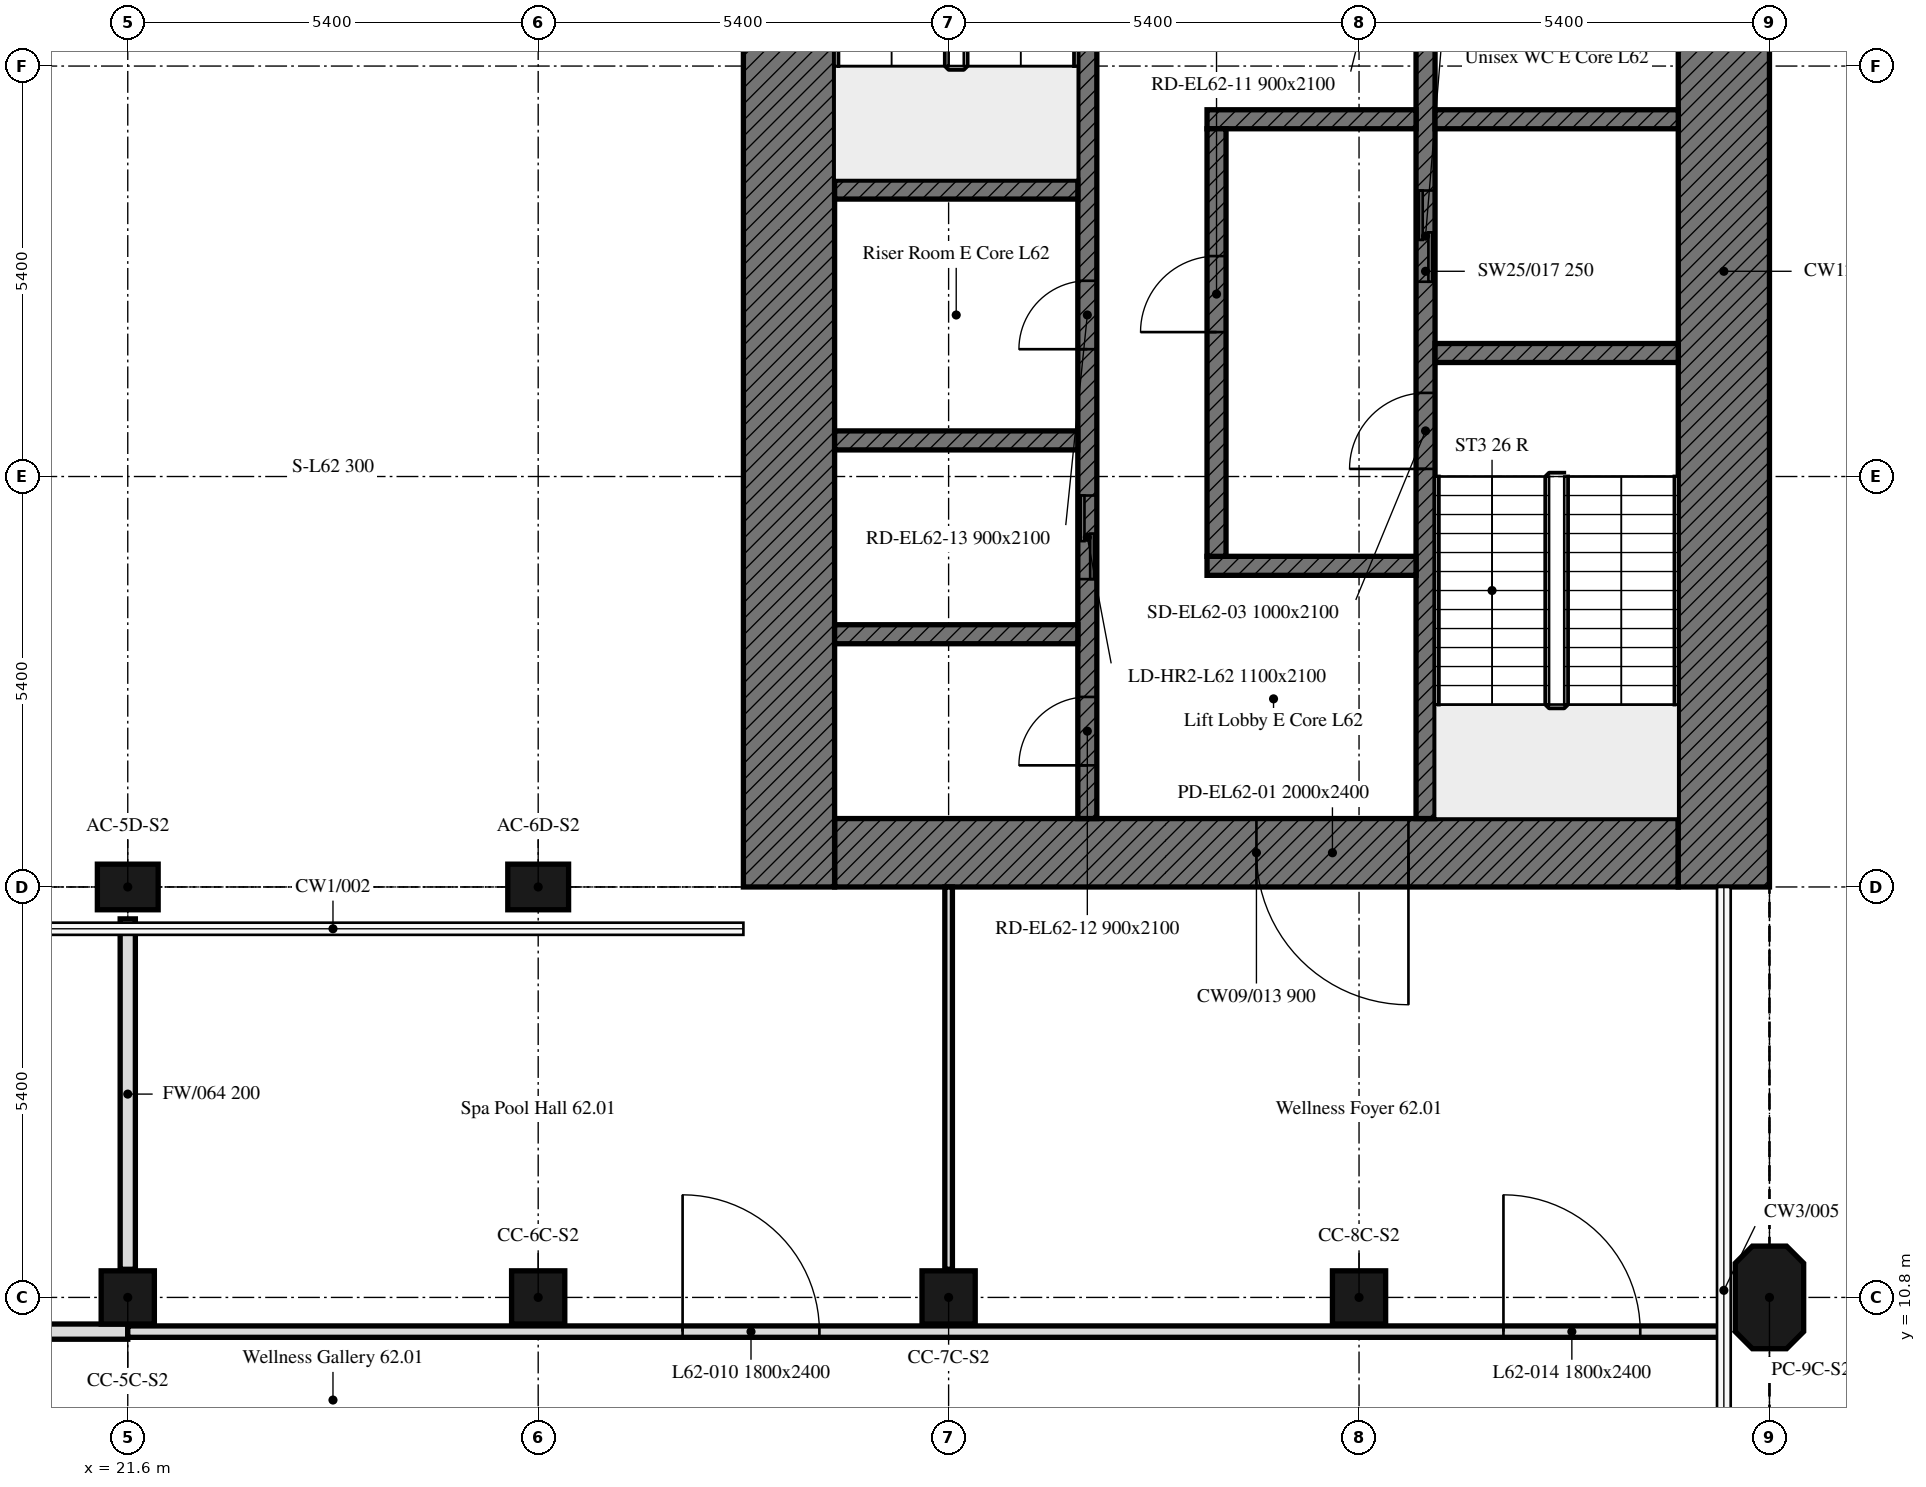
"""IFC4 building model, lengths in metres.
Left out: names, types, materials, properties, quantities, classifications, styles, units other than length and angle.
Written with IfcOpenShell. Run it as: python <this file> out.ifc"""

import sys

from ifc_helpers import new_model, si_unit, direction, frame, frame_2d, origin, origin_2d, place, context, subcontext, project, spatial, polyline, rectangle, outline, extrude, element, fill, save


model = new_model("IFC4")
c1 = context("Model", 3, precision=1e-05, world=origin(), true_north=direction((0.0, 1.0)))
c2 = subcontext(c1, "Body", "Model", "MODEL_VIEW")
j1 = project(units=[si_unit("LENGTHUNIT", "METRE"), si_unit("PLANEANGLEUNIT", "RADIAN")], contexts=[c1])
p1 = place(None, origin())
s1 = spatial("IfcSite", under=j1, at=p1, CompositionType="ELEMENT")
p2 = place(p1, origin())
s2 = spatial("IfcBuilding", under=s1, at=p2, CompositionType="ELEMENT")
p3 = place(p2, frame((0.0, 0.0, 255.7)))
s3 = spatial("IfcBuildingStorey", under=s2, at=p3, CompositionType="ELEMENT", Elevation=255.7)
for number, where, z_axis, x_axis in (
    (1, (21.6, 10.8, 0.0), (0.0, 0.0, 1.0), (1.0, 0.0, 0.0)),
    (2, (27.0, 10.8, 0.0), (0.0, 0.0, 1.0), (1.0, 0.0, 0.0)),
    (3, (32.4, 10.8, 0.0), (0.0, 0.0, 1.0), (1.0, 0.0, 0.0)),
    (4, (37.8, 10.8, 0.0), (0.0, 0.0, 1.0), (1.0, 0.0, 0.0)),
):
    element("IfcColumn", number, at=place(p3, frame(where, z_axis=z_axis, x_axis=x_axis)), inside=s3, PredefinedType="COLUMN", context=c2, shape_type="SweptSolid", body=[
        extrude(rectangle(XDim=0.7, YDim=0.7, at=origin_2d()), origin(), (0.0, 0.0, 1.0), 4.5),
    ])
p4 = place(p3, frame((43.2, 10.8, 0.0), z_axis=(0.0, 0.0, 1.0), x_axis=(0.0, 1.0, 0.0)))
e5 = element("IfcColumn", 5, at=p4, inside=s3, PredefinedType="COLUMN", context=c2, shape_type="SweptSolid", body=[
    extrude(outline(polyline([(-0.45, -0.45), (0.45, -0.45), (0.675, -0.225), (0.675, 0.225), (0.45, 0.45), (-0.45, 0.45), (-0.675, 0.225), (-0.675, -0.225), (-0.45, -0.45)])), origin(), (0.0, 0.0, 1.0), 4.5),
])
for number, where, z_axis, x_axis in (
    (6, (21.6, 16.2, 0.0), (0.0, 0.0, 1.0), (1.0, 0.0, 0.0)),
    (7, (27.0, 16.2, 0.0), (0.0, 0.0, 1.0), (1.0, 0.0, 0.0)),
):
    element("IfcColumn", number, at=place(p3, frame(where, z_axis=z_axis, x_axis=x_axis)), inside=s3, PredefinedType="COLUMN", context=c2, shape_type="SweptSolid", body=[
        extrude(rectangle(XDim=0.8, YDim=0.6, at=origin_2d()), origin(), (0.0, 0.0, 1.0), 4.5),
    ])
p5 = place(p3, frame((42.0, 16.65, 0.0), z_axis=(0.0, 0.0, 1.0), x_axis=(-1.0, 0.0, 0.0)))
e8 = element("IfcWall", 8, at=p5, inside=s3, PredefinedType="SOLIDWALL", context=c2, shape_type="SweptSolid", body=[
    extrude(rectangle(XDim=11.1, YDim=0.9, at=frame_2d((5.55, 0.0))), origin(), (0.0, 0.0, 1.0), 4.5),
])
p6 = place(p5, frame((3.55, 0.0, 0.0)))
e9 = element("IfcOpeningElement", 9, at=p6, cuts=e8, PredefinedType="OPENING", context=c2, shape_type="SweptSolid", body=[
    extrude(rectangle(XDim=2.0, YDim=2.4, at=frame_2d((1.0, 1.2))), frame((0.0, 0.45, 0.0), z_axis=(0.0, -1.0, 0.0), x_axis=(1.0, 0.0, 0.0)), (0.0, 0.0, 1.0), 0.9),
])
for number, where, z_axis, x_axis in (
    (10, (42.6, 32.4, 0.0), (0.0, 0.0, 1.0), (0.0, -1.0, 0.0)),
    (11, (30.3, 16.2, 0.0), (0.0, 0.0, 1.0), (0.0, 1.0, 0.0)),
):
    element("IfcWall", number, at=place(p3, frame(where, z_axis=z_axis, x_axis=x_axis)), inside=s3, PredefinedType="SOLIDWALL", context=c2, shape_type="SweptSolid", body=[
        extrude(rectangle(XDim=16.2, YDim=1.2, at=frame_2d((8.1, 0.0))), origin(), (0.0, 0.0, 1.0), 4.5),
    ])
p7 = place(p3, frame((38.675, 17.1, 0.0), z_axis=(0.0, 0.0, 1.0), x_axis=(0.0, 1.0, 0.0)))
e12 = element("IfcWall", 12, at=p7, inside=s3, PredefinedType="SOLIDWALL", context=c2, shape_type="SweptSolid", body=[
    extrude(rectangle(XDim=14.4, YDim=0.25, at=frame_2d((7.2, 0.0))), origin(), (0.0, 0.0, 1.0), 4.5),
])
p8 = place(p7, frame((4.6, 0.0, 0.0)))
e13 = element("IfcOpeningElement", 13, at=p8, cuts=e12, PredefinedType="OPENING", context=c2, shape_type="SweptSolid", body=[
    extrude(rectangle(XDim=1.0, YDim=2.1, at=frame_2d((0.5, 1.05))), frame((0.0, 0.125, 0.0), z_axis=(0.0, -1.0, 0.0), x_axis=(1.0, 0.0, 0.0)), (0.0, 0.0, 1.0), 0.25),
])
p9 = place(p7, frame((7.062, 0.0, 0.0)))
e14 = element("IfcOpeningElement", 14, at=p9, cuts=e12, PredefinedType="OPENING", context=c2, shape_type="SweptSolid", body=[
    extrude(rectangle(XDim=1.2, YDim=2.1, at=frame_2d((0.6, 1.05))), frame((0.0, 0.125, 0.0), z_axis=(0.0, -1.0, 0.0), x_axis=(1.0, 0.0, 0.0)), (0.0, 0.0, 1.0), 0.25),
])
p10 = place(p7, frame((10.106, 0.0, 0.0)))
e15 = element("IfcOpeningElement", 15, at=p10, cuts=e12, PredefinedType="OPENING", context=c2, shape_type="SweptSolid", body=[
    extrude(rectangle(XDim=0.9, YDim=2.1, at=frame_2d((0.45, 1.05))), frame((0.0, 0.125, 0.0), z_axis=(0.0, -1.0, 0.0), x_axis=(1.0, 0.0, 0.0)), (0.0, 0.0, 1.0), 0.25),
])
p11 = place(p7, frame((12.048, 0.0, 0.0)))
e16 = element("IfcOpeningElement", 16, at=p11, cuts=e12, PredefinedType="OPENING", context=c2, shape_type="SweptSolid", body=[
    extrude(rectangle(XDim=0.9, YDim=2.1, at=frame_2d((0.45, 1.05))), frame((0.0, 0.125, 0.0), z_axis=(0.0, -1.0, 0.0), x_axis=(1.0, 0.0, 0.0)), (0.0, 0.0, 1.0), 0.25),
])
p12 = place(p7, frame((13.354, 0.0, 0.0)))
e17 = element("IfcOpeningElement", 17, at=p12, cuts=e12, PredefinedType="OPENING", context=c2, shape_type="SweptSolid", body=[
    extrude(rectangle(XDim=0.9, YDim=2.1, at=frame_2d((0.45, 1.05))), frame((0.0, 0.125, 0.0), z_axis=(0.0, -1.0, 0.0), x_axis=(1.0, 0.0, 0.0)), (0.0, 0.0, 1.0), 0.25),
])
p13 = place(p3, frame((34.225, 17.1, 0.0), z_axis=(0.0, 0.0, 1.0), x_axis=(0.0, 1.0, 0.0)))
e18 = element("IfcWall", 18, at=p13, inside=s3, PredefinedType="SOLIDWALL", context=c2, shape_type="SweptSolid", body=[
    extrude(rectangle(XDim=14.4, YDim=0.25, at=frame_2d((7.2, 0.0))), origin(), (0.0, 0.0, 1.0), 4.5),
])
p14 = place(p13, frame((13.15, 0.0, 0.0)))
e19 = element("IfcOpeningElement", 19, at=p14, cuts=e18, PredefinedType="OPENING", context=c2, shape_type="SweptSolid", body=[
    extrude(rectangle(XDim=1.0, YDim=2.1, at=frame_2d((0.5, 1.05))), frame((0.0, 0.125, 0.0), z_axis=(0.0, -1.0, 0.0), x_axis=(1.0, 0.0, 0.0)), (0.0, 0.0, 1.0), 0.25),
])
p15 = place(p13, frame((3.15, 0.0, 0.0)))
e20 = element("IfcOpeningElement", 20, at=p15, cuts=e18, PredefinedType="OPENING", context=c2, shape_type="SweptSolid", body=[
    extrude(rectangle(XDim=1.1, YDim=2.1, at=frame_2d((0.55, 1.05))), frame((0.0, 0.125, 0.0), z_axis=(0.0, -1.0, 0.0), x_axis=(1.0, 0.0, 0.0)), (0.0, 0.0, 1.0), 0.25),
])
p16 = place(p13, frame((0.7, 0.0, 0.0)))
e21 = element("IfcOpeningElement", 21, at=p16, cuts=e18, PredefinedType="OPENING", context=c2, shape_type="SweptSolid", body=[
    extrude(rectangle(XDim=0.9, YDim=2.1, at=frame_2d((0.45, 1.05))), frame((0.0, 0.125, 0.0), z_axis=(0.0, -1.0, 0.0), x_axis=(1.0, 0.0, 0.0)), (0.0, 0.0, 1.0), 0.25),
])
p17 = place(p13, frame((6.175, 0.0, 0.0)))
e22 = element("IfcOpeningElement", 22, at=p17, cuts=e18, PredefinedType="OPENING", context=c2, shape_type="SweptSolid", body=[
    extrude(rectangle(XDim=0.9, YDim=2.1, at=frame_2d((0.45, 1.05))), frame((0.0, 0.125, 0.0), z_axis=(0.0, -1.0, 0.0), x_axis=(1.0, 0.0, 0.0)), (0.0, 0.0, 1.0), 0.25),
])
p18 = place(p3, frame((38.8, 23.225, 0.0), z_axis=(0.0, 0.0, 1.0), x_axis=(1.0, 0.0, 0.0)))
e23 = element("IfcWall", 23, at=p18, inside=s3, PredefinedType="SOLIDWALL", context=c2, shape_type="SweptSolid", body=[
    extrude(rectangle(XDim=3.2, YDim=0.25, at=frame_2d((1.6, 0.0))), origin(), (0.0, 0.0, 1.0), 4.5),
])
for number, where, z_axis, x_axis in (
    (24, (30.9, 25.375, 0.0), (0.0, 0.0, 1.0), (1.0, 0.0, 0.0)),
    (25, (30.9, 22.075, 0.0), (0.0, 0.0, 1.0), (1.0, 0.0, 0.0)),
):
    element("IfcWall", number, at=place(p3, frame(where, z_axis=z_axis, x_axis=x_axis)), inside=s3, PredefinedType="SOLIDWALL", context=c2, shape_type="SweptSolid", body=[
        extrude(rectangle(XDim=3.2, YDim=0.25, at=frame_2d((1.6, 0.0))), origin(), (0.0, 0.0, 1.0), 4.5),
    ])
p19 = place(p3, frame((38.8, 26.3, 0.0), z_axis=(0.0, 0.0, 1.0), x_axis=(1.0, 0.0, 0.0)))
e26 = element("IfcWall", 26, at=p19, inside=s3, PredefinedType="SOLIDWALL", context=c2, shape_type="SweptSolid", body=[
    extrude(rectangle(XDim=3.2, YDim=0.25, at=frame_2d((1.6, 0.0))), origin(), (0.0, 0.0, 1.0), 4.5),
])
for number, where, z_axis, x_axis in (
    (27, (35.8, 26.3, 0.0), (0.0, 0.0, 1.0), (1.0, 0.0, 0.0)),
    (28, (35.8, 20.425, 0.0), (0.0, 0.0, 1.0), (1.0, 0.0, 0.0)),
):
    element("IfcWall", number, at=place(p3, frame(where, z_axis=z_axis, x_axis=x_axis)), inside=s3, PredefinedType="SOLIDWALL", context=c2, shape_type="SweptSolid", body=[
        extrude(rectangle(XDim=2.75, YDim=0.25, at=frame_2d((1.375, 0.0))), origin(), (0.0, 0.0, 1.0), 4.5),
    ])
p20 = place(p3, frame((35.925, 20.55, 0.0), z_axis=(0.0, 0.0, 1.0), x_axis=(0.0, 1.0, 0.0)))
e29 = element("IfcWall", 29, at=p20, inside=s3, PredefinedType="SOLIDWALL", context=c2, shape_type="SweptSolid", body=[
    extrude(rectangle(XDim=5.625, YDim=0.25, at=frame_2d((2.812, 0.0))), origin(), (0.0, 0.0, 1.0), 4.5),
])
p21 = place(p20, frame((2.95, 0.0, 0.0)))
e30 = element("IfcOpeningElement", 30, at=p21, cuts=e29, PredefinedType="OPENING", context=c2, shape_type="SweptSolid", body=[
    extrude(rectangle(XDim=1.0, YDim=2.1, at=frame_2d((0.5, 1.05))), frame((0.0, 0.125, 0.0), z_axis=(0.0, -1.0, 0.0), x_axis=(1.0, 0.0, 0.0)), (0.0, 0.0, 1.0), 0.25),
])
p22 = place(p3, frame((30.9, 19.525, 0.0), z_axis=(0.0, 0.0, 1.0), x_axis=(1.0, 0.0, 0.0)))
e31 = element("IfcWall", 31, at=p22, inside=s3, PredefinedType="SOLIDWALL", context=c2, shape_type="SweptSolid", body=[
    extrude(rectangle(XDim=3.2, YDim=0.25, at=frame_2d((1.6, 0.0))), origin(), (0.0, 0.0, 1.0), 4.5),
])
p23 = place(p3, frame((32.4, 11.17, 0.0), z_axis=(0.0, 0.0, 1.0), x_axis=(0.0, 1.0, 0.0)))
e32 = element("IfcWall", 32, at=p23, inside=s3, PredefinedType="PARTITIONING", context=c2, shape_type="SweptSolid", body=[
    extrude(rectangle(XDim=5.03, YDim=0.1, at=frame_2d((2.515, 0.0))), origin(), (0.0, 0.0, 1.0), 3.75),
])
p24 = place(p3, frame((21.6, 15.78, 0.0), z_axis=(0.0, 0.0, 1.0), x_axis=(0.0, -1.0, 0.0)))
e33 = element("IfcWall", 33, at=p24, inside=s3, PredefinedType="PARTITIONING", context=c2, shape_type="SweptSolid", body=[
    extrude(rectangle(XDim=4.61, YDim=0.2, at=frame_2d((2.305, 0.0))), origin(), (0.0, 0.0, 1.0), 3.75),
])
p25 = place(p3, frame((16.2, 10.35, 0.0), z_axis=(0.0, 0.0, 1.0), x_axis=(1.0, 0.0, 0.0)))
e34 = element("IfcWall", 34, at=p25, inside=s3, PredefinedType="PARTITIONING", context=c2, shape_type="SweptSolid", body=[
    extrude(rectangle(XDim=5.4, YDim=0.2, at=frame_2d((2.7, 0.0))), origin(), (0.0, 0.0, 1.0), 4.5),
])
p26 = place(p25, frame((1.8, 0.0, 0.0)))
e35 = element("IfcOpeningElement", 35, at=p26, cuts=e34, PredefinedType="OPENING", context=c2, shape_type="SweptSolid", body=[
    extrude(rectangle(XDim=1.8, YDim=2.4, at=frame_2d((0.9, 1.2))), frame((0.0, 0.1, 0.0), z_axis=(0.0, -1.0, 0.0), x_axis=(1.0, 0.0, 0.0)), (0.0, 0.0, 1.0), 0.2),
])
p27 = place(p3, frame((21.6, 10.35, 0.0), z_axis=(0.0, 0.0, 1.0), x_axis=(1.0, 0.0, 0.0)))
e36 = element("IfcWall", 36, at=p27, inside=s3, PredefinedType="PARTITIONING", context=c2, shape_type="SweptSolid", body=[
    extrude(rectangle(XDim=21.0, YDim=0.15, at=frame_2d((10.5, 0.0))), origin(), (0.0, 0.0, 1.0), 3.75),
])
p28 = place(p27, frame((7.3, 0.0, 0.0)))
e37 = element("IfcOpeningElement", 37, at=p28, cuts=e36, PredefinedType="OPENING", context=c2, shape_type="SweptSolid", body=[
    extrude(rectangle(XDim=1.8, YDim=2.4, at=frame_2d((0.9, 1.2))), frame((0.0, 0.075, 0.0), z_axis=(0.0, -1.0, 0.0), x_axis=(1.0, 0.0, 0.0)), (0.0, 0.0, 1.0), 0.15),
])
p29 = place(p27, frame((18.1, 0.0, 0.0)))
e38 = element("IfcOpeningElement", 38, at=p29, cuts=e36, PredefinedType="OPENING", context=c2, shape_type="SweptSolid", body=[
    extrude(rectangle(XDim=1.8, YDim=2.4, at=frame_2d((0.9, 1.2))), frame((0.0, 0.075, 0.0), z_axis=(0.0, -1.0, 0.0), x_axis=(1.0, 0.0, 0.0)), (0.0, 0.0, 1.0), 0.15),
])
p30 = place(p6, origin())
e39 = element("IfcDoor", 39, at=p30, inside=s3, OperationType="DOUBLE_DOOR_SINGLE_SWING", PredefinedType="DOOR", context=c2, shape_type="SweptSolid", body=[
    extrude(rectangle(XDim=2.0, YDim=2.4, at=frame_2d((1.0, 1.2))), frame((0.0, 0.025, 0.0), z_axis=(0.0, -1.0, 0.0), x_axis=(1.0, 0.0, 0.0)), (0.0, 0.0, 1.0), 0.05),
])
fill(e9, e39)
p31 = place(p8, origin())
e40 = element("IfcDoor", 40, at=p31, inside=s3, OperationType="SINGLE_SWING_LEFT", PredefinedType="DOOR", context=c2, shape_type="SweptSolid", body=[
    extrude(rectangle(XDim=1.0, YDim=2.1, at=frame_2d((0.5, 1.05))), frame((0.0, 0.025, 0.0), z_axis=(0.0, -1.0, 0.0), x_axis=(1.0, 0.0, 0.0)), (0.0, 0.0, 1.0), 0.05),
])
fill(e13, e40)
p32 = place(p21, origin())
e41 = element("IfcDoor", 41, at=p32, inside=s3, OperationType="SINGLE_SWING_LEFT", PredefinedType="DOOR", context=c2, shape_type="SweptSolid", body=[
    extrude(rectangle(XDim=1.0, YDim=2.1, at=frame_2d((0.5, 1.05))), frame((0.0, 0.025, 0.0), z_axis=(0.0, -1.0, 0.0), x_axis=(1.0, 0.0, 0.0)), (0.0, 0.0, 1.0), 0.05),
])
fill(e30, e41)
p33 = place(p9, origin())
e42 = element("IfcDoor", 42, at=p33, inside=s3, OperationType="DOUBLE_DOOR_SLIDING", PredefinedType="DOOR", context=c2, shape_type="SweptSolid", body=[
    extrude(rectangle(XDim=1.2, YDim=2.1, at=frame_2d((0.6, 1.05))), frame((0.0, 0.025, 0.0), z_axis=(0.0, -1.0, 0.0), x_axis=(1.0, 0.0, 0.0)), (0.0, 0.0, 1.0), 0.05),
])
fill(e14, e42)
p34 = place(p15, origin())
e43 = element("IfcDoor", 43, at=p34, inside=s3, OperationType="DOUBLE_DOOR_SLIDING", PredefinedType="DOOR", context=c2, shape_type="SweptSolid", body=[
    extrude(rectangle(XDim=1.1, YDim=2.1, at=frame_2d((0.55, 1.05))), frame((0.0, 0.025, 0.0), z_axis=(0.0, -1.0, 0.0), x_axis=(1.0, 0.0, 0.0)), (0.0, 0.0, 1.0), 0.05),
])
fill(e20, e43)
p35 = place(p16, origin())
e44 = element("IfcDoor", 44, at=p35, inside=s3, OperationType="SINGLE_SWING_LEFT", PredefinedType="DOOR", context=c2, shape_type="SweptSolid", body=[
    extrude(rectangle(XDim=0.9, YDim=2.1, at=frame_2d((0.45, 1.05))), frame((0.0, 0.025, 0.0), z_axis=(0.0, -1.0, 0.0), x_axis=(1.0, 0.0, 0.0)), (0.0, 0.0, 1.0), 0.05),
])
fill(e21, e44)
p36 = place(p17, origin())
e45 = element("IfcDoor", 45, at=p36, inside=s3, OperationType="SINGLE_SWING_LEFT", PredefinedType="DOOR", context=c2, shape_type="SweptSolid", body=[
    extrude(rectangle(XDim=0.9, YDim=2.1, at=frame_2d((0.45, 1.05))), frame((0.0, 0.025, 0.0), z_axis=(0.0, -1.0, 0.0), x_axis=(1.0, 0.0, 0.0)), (0.0, 0.0, 1.0), 0.05),
])
fill(e22, e45)
p37 = place(p28, origin())
e46 = element("IfcDoor", 46, at=p37, inside=s3, OperationType="DOUBLE_DOOR_SINGLE_SWING", PredefinedType="DOOR", context=c2, shape_type="SweptSolid", body=[
    extrude(rectangle(XDim=1.8, YDim=2.4, at=frame_2d((0.9, 1.2))), frame((0.0, 0.025, 0.0), z_axis=(0.0, -1.0, 0.0), x_axis=(1.0, 0.0, 0.0)), (0.0, 0.0, 1.0), 0.05),
])
fill(e37, e46)
p38 = place(p29, origin())
e47 = element("IfcDoor", 47, at=p38, inside=s3, OperationType="DOUBLE_DOOR_SINGLE_SWING", PredefinedType="DOOR", context=c2, shape_type="SweptSolid", body=[
    extrude(rectangle(XDim=1.8, YDim=2.4, at=frame_2d((0.9, 1.2))), frame((0.0, 0.025, 0.0), z_axis=(0.0, -1.0, 0.0), x_axis=(1.0, 0.0, 0.0)), (0.0, 0.0, 1.0), 0.05),
])
fill(e38, e47)
save(model, sys.argv[1])
